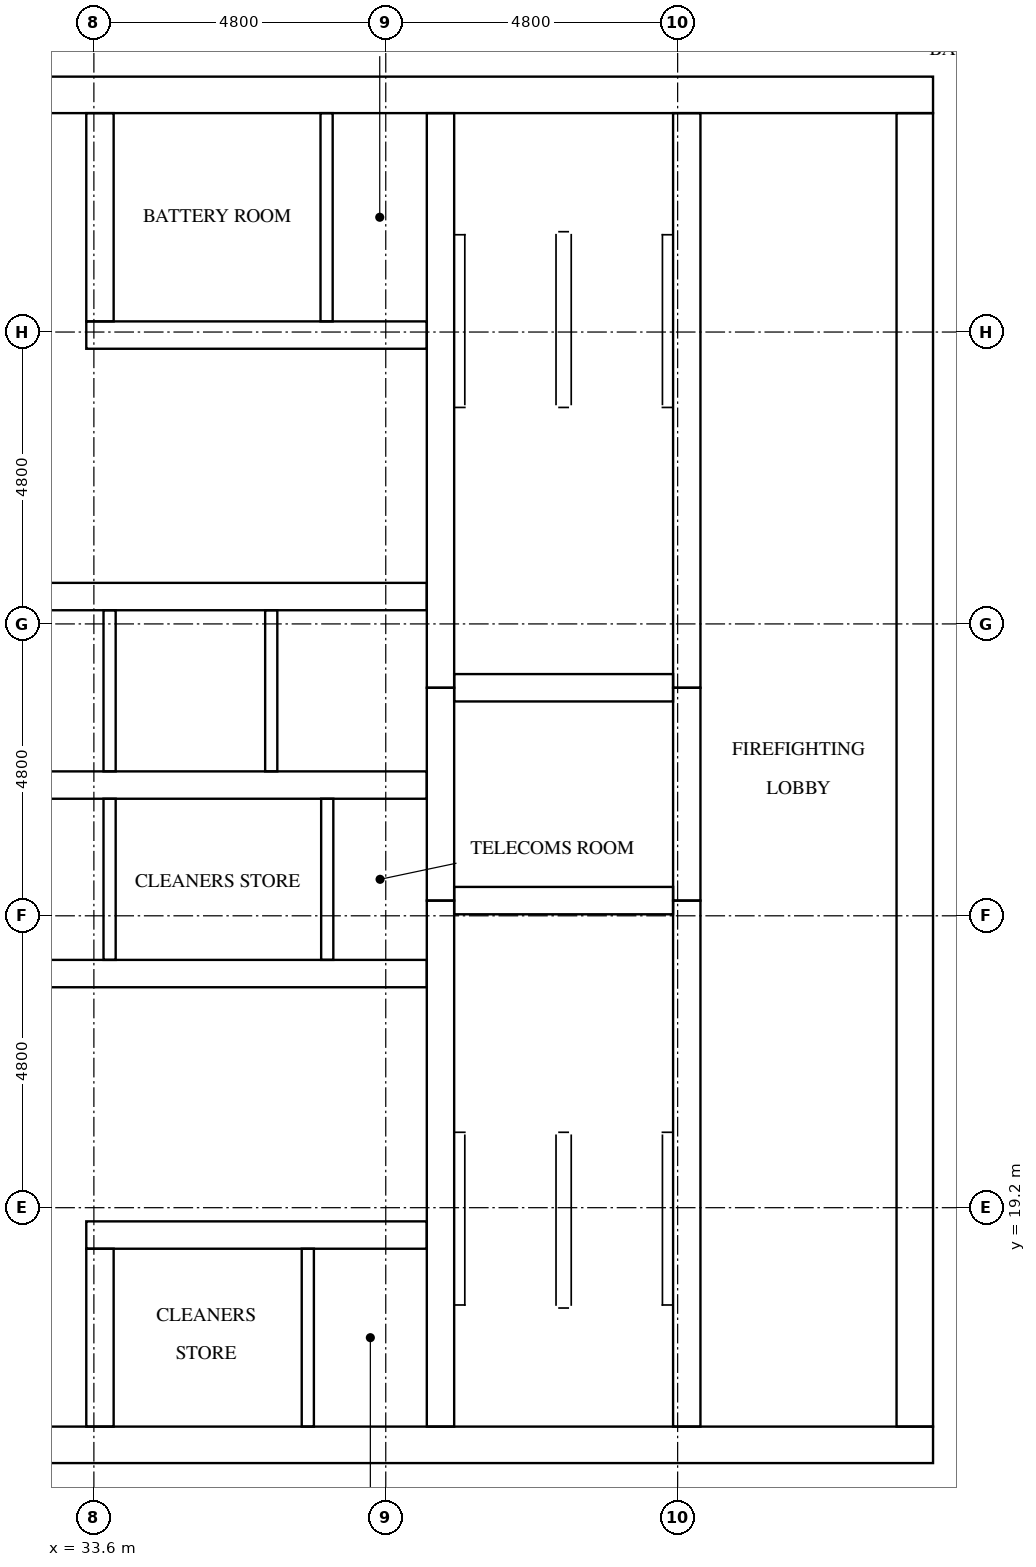
"""IFC4 building model, lengths in metres.
Left out: names, types, materials, properties, quantities, classifications, styles, units other than length and angle.
Written with IfcOpenShell. Run it as: python <this file> out.ifc"""

import sys

from ifc_helpers import new_model, si_unit, direction, frame, frame_2d, origin, place, context, subcontext, project, spatial, rectangle, extrude, element, fill, save


model = new_model("IFC4")
c1 = context("Model", 3, precision=1e-05, world=origin(), true_north=direction((0.0, 1.0)))
c2 = subcontext(c1, "Body", "Model", "MODEL_VIEW")
j1 = project(units=[si_unit("LENGTHUNIT", "METRE"), si_unit("PLANEANGLEUNIT", "RADIAN")], contexts=[c1])
p1 = place(None, origin())
s1 = spatial("IfcSite", under=j1, at=p1, CompositionType="ELEMENT")
p2 = place(p1, origin())
s2 = spatial("IfcBuilding", under=s1, at=p2, CompositionType="ELEMENT")
p3 = place(p2, frame((0.0, 0.0, 238.7)))
s3 = spatial("IfcBuildingStorey", under=s2, at=p3, CompositionType="ELEMENT", Elevation=238.7)
p4 = place(p3, frame((15.0, 15.3, 0.0), z_axis=(0.0, 0.0, 1.0), x_axis=(1.0, 0.0, 0.0)))
e1 = element("IfcWall", 1, at=p4, inside=s3, PredefinedType="SHEAR", context=c2, shape_type="SweptSolid", body=[
    extrude(rectangle(XDim=32.4, YDim=0.6, at=frame_2d((16.2, 0.0))), origin(), (0.0, 0.0, 1.0), 3.2),
])
p5 = place(p4, frame((15.3, 0.0, 0.0)))
e2 = element("IfcOpeningElement", 2, at=p5, cuts=e1, PredefinedType="OPENING", context=c2, shape_type="SweptSolid", body=[
    extrude(rectangle(XDim=1.8, YDim=2.1, at=frame_2d((0.9, 1.05))), frame((0.0, 0.31, 0.0), z_axis=(0.0, -1.0, 0.0), x_axis=(1.0, 0.0, 0.0)), (0.0, 0.0, 1.0), 0.62),
])
p6 = place(p3, frame((15.0, 37.5, 0.0), z_axis=(0.0, 0.0, 1.0), x_axis=(1.0, 0.0, 0.0)))
e3 = element("IfcWall", 3, at=p6, inside=s3, PredefinedType="SHEAR", context=c2, shape_type="SweptSolid", body=[
    extrude(rectangle(XDim=32.4, YDim=0.6, at=frame_2d((16.2, 0.0))), origin(), (0.0, 0.0, 1.0), 3.2),
])
p7 = place(p6, frame((15.3, 0.0, 0.0)))
e4 = element("IfcOpeningElement", 4, at=p7, cuts=e3, PredefinedType="OPENING", context=c2, shape_type="SweptSolid", body=[
    extrude(rectangle(XDim=1.8, YDim=2.1, at=frame_2d((0.9, 1.05))), frame((0.0, 0.31, 0.0), z_axis=(0.0, -1.0, 0.0), x_axis=(1.0, 0.0, 0.0)), (0.0, 0.0, 1.0), 0.62),
])
p8 = place(p6, frame((1.25, 0.0, 0.0)))
e5 = element("IfcOpeningElement", 5, at=p8, cuts=e3, PredefinedType="OPENING", context=c2, shape_type="SweptSolid", body=[
    extrude(rectangle(XDim=1.0, YDim=2.1, at=frame_2d((0.5, 1.05))), frame((0.0, 0.31, 0.0), z_axis=(0.0, -1.0, 0.0), x_axis=(1.0, 0.0, 0.0)), (0.0, 0.0, 1.0), 0.62),
])
p9 = place(p6, frame((4.988, 0.0, 0.0)))
e6 = element("IfcOpeningElement", 6, at=p9, cuts=e3, PredefinedType="OPENING", context=c2, shape_type="SweptSolid", body=[
    extrude(rectangle(XDim=1.0, YDim=2.1, at=frame_2d((0.5, 1.05))), frame((0.0, 0.31, 0.0), z_axis=(0.0, -1.0, 0.0), x_axis=(1.0, 0.0, 0.0)), (0.0, 0.0, 1.0), 0.62),
])
p10 = place(p3, frame((47.1, 15.6, 0.0), z_axis=(0.0, 0.0, 1.0), x_axis=(0.0, 1.0, 0.0)))
e7 = element("IfcWall", 7, at=p10, inside=s3, PredefinedType="SHEAR", context=c2, shape_type="SweptSolid", body=[
    extrude(rectangle(XDim=21.6, YDim=0.6, at=frame_2d((10.8, 0.0))), origin(), (0.0, 0.0, 1.0), 3.2),
])
p11 = place(p10, frame((10.5, 0.0, 0.0)))
e8 = element("IfcOpeningElement", 8, at=p11, cuts=e7, PredefinedType="OPENING", context=c2, shape_type="SweptSolid", body=[
    extrude(rectangle(XDim=1.2, YDim=2.1, at=frame_2d((0.6, 1.05))), frame((0.0, 0.31, 0.0), z_axis=(0.0, -1.0, 0.0), x_axis=(1.0, 0.0, 0.0)), (0.0, 0.0, 1.0), 0.62),
])
p12 = place(p3, frame((39.3, 15.6, 0.0), z_axis=(0.0, 0.0, 1.0), x_axis=(0.0, 1.0, 0.0)))
e9 = element("IfcWall", 9, at=p12, inside=s3, PredefinedType="SHEAR", context=c2, shape_type="SweptSolid", body=[
    extrude(rectangle(XDim=8.65, YDim=0.45, at=frame_2d((4.325, 0.0))), origin(), (0.0, 0.0, 1.0), 3.2),
])
p13 = place(p3, frame((39.3, 24.25, 0.0), z_axis=(0.0, 0.0, 1.0), x_axis=(0.0, 1.0, 0.0)))
e10 = element("IfcWall", 10, at=p13, inside=s3, PredefinedType="SHEAR", context=c2, shape_type="SweptSolid", body=[
    extrude(rectangle(XDim=3.5, YDim=0.45, at=frame_2d((1.75, 0.0))), origin(), (0.0, 0.0, 1.0), 3.2),
])
p14 = place(p3, frame((39.3, 27.75, 0.0), z_axis=(0.0, 0.0, 1.0), x_axis=(0.0, 1.0, 0.0)))
e11 = element("IfcWall", 11, at=p14, inside=s3, PredefinedType="SHEAR", context=c2, shape_type="SweptSolid", body=[
    extrude(rectangle(XDim=9.45, YDim=0.45, at=frame_2d((4.725, 0.0))), origin(), (0.0, 0.0, 1.0), 3.2),
])
p15 = place(p3, frame((43.35, 15.6, 0.0), z_axis=(0.0, 0.0, 1.0), x_axis=(0.0, 1.0, 0.0)))
e12 = element("IfcWall", 12, at=p15, inside=s3, PredefinedType="SHEAR", context=c2, shape_type="SweptSolid", body=[
    extrude(rectangle(XDim=8.65, YDim=0.45, at=frame_2d((4.325, 0.0))), origin(), (0.0, 0.0, 1.0), 3.2),
])
p16 = place(p15, frame((0.6, 0.0, 0.0)))
e13 = element("IfcOpeningElement", 13, at=p16, cuts=e12, PredefinedType="OPENING", context=c2, shape_type="SweptSolid", body=[
    extrude(rectangle(XDim=1.2, YDim=2.1, at=frame_2d((0.6, 1.05))), frame((0.0, 0.235, 0.0), z_axis=(0.0, -1.0, 0.0), x_axis=(1.0, 0.0, 0.0)), (0.0, 0.0, 1.0), 0.47),
])
p17 = place(p3, frame((43.35, 24.25, 0.0), z_axis=(0.0, 0.0, 1.0), x_axis=(0.0, 1.0, 0.0)))
e14 = element("IfcWall", 14, at=p17, inside=s3, PredefinedType="SHEAR", context=c2, shape_type="SweptSolid", body=[
    extrude(rectangle(XDim=3.5, YDim=0.45, at=frame_2d((1.75, 0.0))), origin(), (0.0, 0.0, 1.0), 3.2),
])
p18 = place(p17, frame((1.2, 0.0, 0.0)))
e15 = element("IfcOpeningElement", 15, at=p18, cuts=e14, PredefinedType="OPENING", context=c2, shape_type="SweptSolid", body=[
    extrude(rectangle(XDim=1.1, YDim=2.1, at=frame_2d((0.55, 1.05))), frame((0.0, 0.235, 0.0), z_axis=(0.0, -1.0, 0.0), x_axis=(1.0, 0.0, 0.0)), (0.0, 0.0, 1.0), 0.47),
])
p19 = place(p3, frame((43.35, 27.75, 0.0), z_axis=(0.0, 0.0, 1.0), x_axis=(0.0, 1.0, 0.0)))
e16 = element("IfcWall", 16, at=p19, inside=s3, PredefinedType="SHEAR", context=c2, shape_type="SweptSolid", body=[
    extrude(rectangle(XDim=9.45, YDim=0.45, at=frame_2d((4.725, 0.0))), origin(), (0.0, 0.0, 1.0), 3.2),
])
p20 = place(p19, frame((7.65, 0.0, 0.0)))
e17 = element("IfcOpeningElement", 17, at=p20, cuts=e16, PredefinedType="OPENING", context=c2, shape_type="SweptSolid", body=[
    extrude(rectangle(XDim=1.2, YDim=2.1, at=frame_2d((0.6, 1.05))), frame((0.0, 0.235, 0.0), z_axis=(0.0, -1.0, 0.0), x_axis=(1.0, 0.0, 0.0)), (0.0, 0.0, 1.0), 0.47),
])
for number, where, z_axis, x_axis in (
    (18, (39.525, 24.25, 0.0), (0.0, 0.0, 1.0), (1.0, 0.0, 0.0)),
    (19, (39.525, 27.75, 0.0), (0.0, 0.0, 1.0), (1.0, 0.0, 0.0)),
):
    element("IfcWall", number, at=place(p3, frame(where, z_axis=z_axis, x_axis=x_axis)), inside=s3, PredefinedType="SHEAR", context=c2, shape_type="SweptSolid", body=[
        extrude(rectangle(XDim=3.6, YDim=0.45, at=frame_2d((1.8, 0.0))), origin(), (0.0, 0.0, 1.0), 3.2),
    ])
p21 = place(p3, frame((33.475, 18.75, 0.0), z_axis=(0.0, 0.0, 1.0), x_axis=(1.0, 0.0, 0.0)))
e20 = element("IfcWall", 20, at=p21, inside=s3, PredefinedType="SHEAR", context=c2, shape_type="SweptSolid", body=[
    extrude(rectangle(XDim=5.6, YDim=0.45, at=frame_2d((2.8, 0.0))), origin(), (0.0, 0.0, 1.0), 3.2),
])
p22 = place(p21, frame((1.497, 0.0, 0.0)))
e21 = element("IfcOpeningElement", 21, at=p22, cuts=e20, PredefinedType="OPENING", context=c2, shape_type="SweptSolid", body=[
    extrude(rectangle(XDim=1.0, YDim=2.1, at=frame_2d((0.5, 1.05))), frame((0.0, 0.235, 0.0), z_axis=(0.0, -1.0, 0.0), x_axis=(1.0, 0.0, 0.0)), (0.0, 0.0, 1.0), 0.47),
])
p23 = place(p21, frame((4.171, 0.0, 0.0)))
e22 = element("IfcOpeningElement", 22, at=p23, cuts=e20, PredefinedType="OPENING", context=c2, shape_type="SweptSolid", body=[
    extrude(rectangle(XDim=1.0, YDim=2.1, at=frame_2d((0.5, 1.05))), frame((0.0, 0.235, 0.0), z_axis=(0.0, -1.0, 0.0), x_axis=(1.0, 0.0, 0.0)), (0.0, 0.0, 1.0), 0.47),
])
p24 = place(p3, frame((23.325, 23.05, 0.0), z_axis=(0.0, 0.0, 1.0), x_axis=(1.0, 0.0, 0.0)))
e23 = element("IfcWall", 23, at=p24, inside=s3, PredefinedType="SHEAR", context=c2, shape_type="SweptSolid", body=[
    extrude(rectangle(XDim=15.75, YDim=0.45, at=frame_2d((7.875, 0.0))), origin(), (0.0, 0.0, 1.0), 3.2),
])
p25 = place(p24, frame((2.058, 0.0, 0.0)))
e24 = element("IfcOpeningElement", 24, at=p25, cuts=e23, PredefinedType="OPENING", context=c2, shape_type="SweptSolid", body=[
    extrude(rectangle(XDim=1.0, YDim=2.1, at=frame_2d((0.5, 1.05))), frame((0.0, 0.235, 0.0), z_axis=(0.0, -1.0, 0.0), x_axis=(1.0, 0.0, 0.0)), (0.0, 0.0, 1.0), 0.47),
])
p26 = place(p24, frame((11.823, 0.0, 0.0)))
e25 = element("IfcOpeningElement", 25, at=p26, cuts=e23, PredefinedType="OPENING", context=c2, shape_type="SweptSolid", body=[
    extrude(rectangle(XDim=1.0, YDim=2.1, at=frame_2d((0.5, 1.05))), frame((0.0, 0.235, 0.0), z_axis=(0.0, -1.0, 0.0), x_axis=(1.0, 0.0, 0.0)), (0.0, 0.0, 1.0), 0.47),
])
p27 = place(p24, frame((14.481, 0.0, 0.0)))
e26 = element("IfcOpeningElement", 26, at=p27, cuts=e23, PredefinedType="OPENING", context=c2, shape_type="SweptSolid", body=[
    extrude(rectangle(XDim=1.0, YDim=2.1, at=frame_2d((0.5, 1.05))), frame((0.0, 0.235, 0.0), z_axis=(0.0, -1.0, 0.0), x_axis=(1.0, 0.0, 0.0)), (0.0, 0.0, 1.0), 0.47),
])
p28 = place(p3, frame((23.325, 26.15, 0.0), z_axis=(0.0, 0.0, 1.0), x_axis=(1.0, 0.0, 0.0)))
e27 = element("IfcWall", 27, at=p28, inside=s3, PredefinedType="SHEAR", context=c2, shape_type="SweptSolid", body=[
    extrude(rectangle(XDim=15.75, YDim=0.45, at=frame_2d((7.875, 0.0))), origin(), (0.0, 0.0, 1.0), 3.2),
])
p29 = place(p3, frame((23.325, 29.25, 0.0), z_axis=(0.0, 0.0, 1.0), x_axis=(1.0, 0.0, 0.0)))
e28 = element("IfcWall", 28, at=p29, inside=s3, PredefinedType="SHEAR", context=c2, shape_type="SweptSolid", body=[
    extrude(rectangle(XDim=15.75, YDim=0.45, at=frame_2d((7.875, 0.0))), origin(), (0.0, 0.0, 1.0), 3.2),
])
p30 = place(p29, frame((0.679, 0.0, 0.0)))
e29 = element("IfcOpeningElement", 29, at=p30, cuts=e28, PredefinedType="OPENING", context=c2, shape_type="SweptSolid", body=[
    extrude(rectangle(XDim=1.1, YDim=2.1, at=frame_2d((0.55, 1.05))), frame((0.0, 0.235, 0.0), z_axis=(0.0, -1.0, 0.0), x_axis=(1.0, 0.0, 0.0)), (0.0, 0.0, 1.0), 0.47),
])
p31 = place(p29, frame((3.337, 0.0, 0.0)))
e30 = element("IfcOpeningElement", 30, at=p31, cuts=e28, PredefinedType="OPENING", context=c2, shape_type="SweptSolid", body=[
    extrude(rectangle(XDim=1.1, YDim=2.1, at=frame_2d((0.55, 1.05))), frame((0.0, 0.235, 0.0), z_axis=(0.0, -1.0, 0.0), x_axis=(1.0, 0.0, 0.0)), (0.0, 0.0, 1.0), 0.47),
])
p32 = place(p29, frame((5.996, 0.0, 0.0)))
e31 = element("IfcOpeningElement", 31, at=p32, cuts=e28, PredefinedType="OPENING", context=c2, shape_type="SweptSolid", body=[
    extrude(rectangle(XDim=1.1, YDim=2.1, at=frame_2d((0.55, 1.05))), frame((0.0, 0.235, 0.0), z_axis=(0.0, -1.0, 0.0), x_axis=(1.0, 0.0, 0.0)), (0.0, 0.0, 1.0), 0.47),
])
p33 = place(p29, frame((8.654, 0.0, 0.0)))
e32 = element("IfcOpeningElement", 32, at=p33, cuts=e28, PredefinedType="OPENING", context=c2, shape_type="SweptSolid", body=[
    extrude(rectangle(XDim=1.1, YDim=2.1, at=frame_2d((0.55, 1.05))), frame((0.0, 0.235, 0.0), z_axis=(0.0, -1.0, 0.0), x_axis=(1.0, 0.0, 0.0)), (0.0, 0.0, 1.0), 0.47),
])
p34 = place(p29, frame((11.312, 0.0, 0.0)))
e33 = element("IfcOpeningElement", 33, at=p34, cuts=e28, PredefinedType="OPENING", context=c2, shape_type="SweptSolid", body=[
    extrude(rectangle(XDim=1.1, YDim=2.1, at=frame_2d((0.55, 1.05))), frame((0.0, 0.235, 0.0), z_axis=(0.0, -1.0, 0.0), x_axis=(1.0, 0.0, 0.0)), (0.0, 0.0, 1.0), 0.47),
])
p35 = place(p29, frame((13.971, 0.0, 0.0)))
e34 = element("IfcOpeningElement", 34, at=p35, cuts=e28, PredefinedType="OPENING", context=c2, shape_type="SweptSolid", body=[
    extrude(rectangle(XDim=1.1, YDim=2.1, at=frame_2d((0.55, 1.05))), frame((0.0, 0.235, 0.0), z_axis=(0.0, -1.0, 0.0), x_axis=(1.0, 0.0, 0.0)), (0.0, 0.0, 1.0), 0.47),
])
p36 = place(p3, frame((33.475, 33.55, 0.0), z_axis=(0.0, 0.0, 1.0), x_axis=(1.0, 0.0, 0.0)))
e35 = element("IfcWall", 35, at=p36, inside=s3, PredefinedType="SHEAR", context=c2, shape_type="SweptSolid", body=[
    extrude(rectangle(XDim=5.6, YDim=0.45, at=frame_2d((2.8, 0.0))), origin(), (0.0, 0.0, 1.0), 3.2),
])
p37 = place(p36, frame((1.651, 0.0, 0.0)))
e36 = element("IfcOpeningElement", 36, at=p37, cuts=e35, PredefinedType="OPENING", context=c2, shape_type="SweptSolid", body=[
    extrude(rectangle(XDim=1.0, YDim=2.1, at=frame_2d((0.5, 1.05))), frame((0.0, 0.235, 0.0), z_axis=(0.0, -1.0, 0.0), x_axis=(1.0, 0.0, 0.0)), (0.0, 0.0, 1.0), 0.47),
])
p38 = place(p36, frame((4.326, 0.0, 0.0)))
e37 = element("IfcOpeningElement", 37, at=p38, cuts=e35, PredefinedType="OPENING", context=c2, shape_type="SweptSolid", body=[
    extrude(rectangle(XDim=1.0, YDim=2.1, at=frame_2d((0.5, 1.05))), frame((0.0, 0.235, 0.0), z_axis=(0.0, -1.0, 0.0), x_axis=(1.0, 0.0, 0.0)), (0.0, 0.0, 1.0), 0.47),
])
p39 = place(p3, frame((33.7, 15.6, 0.0), z_axis=(0.0, 0.0, 1.0), x_axis=(0.0, 1.0, 0.0)))
e38 = element("IfcWall", 38, at=p39, inside=s3, PredefinedType="SHEAR", context=c2, shape_type="SweptSolid", body=[
    extrude(rectangle(XDim=2.925, YDim=0.45, at=frame_2d((1.462, 0.0))), origin(), (0.0, 0.0, 1.0), 3.2),
])
p40 = place(p3, frame((33.7, 33.775, 0.0), z_axis=(0.0, 0.0, 1.0), x_axis=(0.0, 1.0, 0.0)))
e39 = element("IfcWall", 39, at=p40, inside=s3, PredefinedType="SHEAR", context=c2, shape_type="SweptSolid", body=[
    extrude(rectangle(XDim=3.425, YDim=0.45, at=frame_2d((1.712, 0.0))), origin(), (0.0, 0.0, 1.0), 3.2),
])
p41 = place(p3, frame((33.858, 23.275, 0.0), z_axis=(0.0, 0.0, 1.0), x_axis=(0.0, 1.0, 0.0)))
e40 = element("IfcWall", 40, at=p41, inside=s3, PredefinedType="SOLIDWALL", context=c2, shape_type="SweptSolid", body=[
    extrude(rectangle(XDim=2.65, YDim=0.2, at=frame_2d((1.325, 0.0))), origin(), (0.0, 0.0, 1.0), 3.2),
])
for number, where, z_axis, x_axis in (
    (41, (33.858, 26.375, 0.0), (0.0, 0.0, 1.0), (0.0, 1.0, 0.0)),
    (42, (36.517, 26.375, 0.0), (0.0, 0.0, 1.0), (0.0, 1.0, 0.0)),
):
    element("IfcWall", number, at=place(p3, frame(where, z_axis=z_axis, x_axis=x_axis)), inside=s3, PredefinedType="SOLIDWALL", context=c2, shape_type="SweptSolid", body=[
        extrude(rectangle(XDim=2.65, YDim=0.2, at=frame_2d((1.325, 0.0))), origin(), (0.0, 0.0, 1.0), 3.2),
    ])
p42 = place(p3, frame((37.438, 23.275, 0.0), z_axis=(0.0, 0.0, 1.0), x_axis=(0.0, 1.0, 0.0)))
e43 = element("IfcWall", 43, at=p42, inside=s3, PredefinedType="PARTITIONING", context=c2, shape_type="SweptSolid", body=[
    extrude(rectangle(XDim=2.65, YDim=0.2, at=frame_2d((1.325, 0.0))), origin(), (0.0, 0.0, 1.0), 3.2),
])
p43 = place(p3, frame((37.118, 15.6, 0.0), z_axis=(0.0, 0.0, 1.0), x_axis=(0.0, 1.0, 0.0)))
e44 = element("IfcWall", 44, at=p43, inside=s3, PredefinedType="PARTITIONING", context=c2, shape_type="SweptSolid", body=[
    extrude(rectangle(XDim=2.925, YDim=0.2, at=frame_2d((1.462, 0.0))), origin(), (0.0, 0.0, 1.0), 3.2),
])
p44 = place(p3, frame((37.427, 33.775, 0.0), z_axis=(0.0, 0.0, 1.0), x_axis=(0.0, 1.0, 0.0)))
e45 = element("IfcWall", 45, at=p44, inside=s3, PredefinedType="PARTITIONING", context=c2, shape_type="SweptSolid", body=[
    extrude(rectangle(XDim=3.425, YDim=0.2, at=frame_2d((1.712, 0.0))), origin(), (0.0, 0.0, 1.0), 3.2),
])
p45 = place(p33, origin())
e46 = element("IfcDoor", 46, at=p45, inside=s3, OperationType="DOUBLE_DOOR_SLIDING", PredefinedType="DOOR", context=c2, shape_type="SweptSolid", body=[
    extrude(rectangle(XDim=1.1, YDim=2.1, at=frame_2d((0.55, 1.05))), frame((0.0, 0.025, 0.0), z_axis=(0.0, -1.0, 0.0), x_axis=(1.0, 0.0, 0.0)), (0.0, 0.0, 1.0), 0.05),
])
fill(e32, e46)
p46 = place(p34, origin())
e47 = element("IfcDoor", 47, at=p46, inside=s3, OperationType="DOUBLE_DOOR_SLIDING", PredefinedType="DOOR", context=c2, shape_type="SweptSolid", body=[
    extrude(rectangle(XDim=1.1, YDim=2.1, at=frame_2d((0.55, 1.05))), frame((0.0, 0.025, 0.0), z_axis=(0.0, -1.0, 0.0), x_axis=(1.0, 0.0, 0.0)), (0.0, 0.0, 1.0), 0.05),
])
fill(e33, e47)
p47 = place(p35, origin())
e48 = element("IfcDoor", 48, at=p47, inside=s3, OperationType="DOUBLE_DOOR_SLIDING", PredefinedType="DOOR", context=c2, shape_type="SweptSolid", body=[
    extrude(rectangle(XDim=1.1, YDim=2.1, at=frame_2d((0.55, 1.05))), frame((0.0, 0.025, 0.0), z_axis=(0.0, -1.0, 0.0), x_axis=(1.0, 0.0, 0.0)), (0.0, 0.0, 1.0), 0.05),
])
fill(e34, e48)
p48 = place(p18, origin())
e49 = element("IfcDoor", 49, at=p48, inside=s3, OperationType="DOUBLE_DOOR_SLIDING", PredefinedType="DOOR", context=c2, shape_type="SweptSolid", body=[
    extrude(rectangle(XDim=1.1, YDim=2.1, at=frame_2d((0.55, 1.05))), frame((0.0, 0.025, 0.0), z_axis=(0.0, -1.0, 0.0), x_axis=(1.0, 0.0, 0.0)), (0.0, 0.0, 1.0), 0.05),
])
fill(e15, e49)
p49 = place(p16, origin())
e50 = element("IfcDoor", 50, at=p49, inside=s3, OperationType="SINGLE_SWING_LEFT", PredefinedType="DOOR", context=c2, shape_type="SweptSolid", body=[
    extrude(rectangle(XDim=1.2, YDim=2.1, at=frame_2d((0.6, 1.05))), frame((0.0, 0.025, 0.0), z_axis=(0.0, -1.0, 0.0), x_axis=(1.0, 0.0, 0.0)), (0.0, 0.0, 1.0), 0.05),
])
fill(e13, e50)
p50 = place(p20, origin())
e51 = element("IfcDoor", 51, at=p50, inside=s3, OperationType="SINGLE_SWING_RIGHT", PredefinedType="DOOR", context=c2, shape_type="SweptSolid", body=[
    extrude(rectangle(XDim=1.2, YDim=2.1, at=frame_2d((0.6, 1.05))), frame((0.0, 0.025, 0.0), z_axis=(0.0, -1.0, 0.0), x_axis=(1.0, 0.0, 0.0)), (0.0, 0.0, 1.0), 0.05),
])
fill(e17, e51)
p51 = place(p11, origin())
e52 = element("IfcDoor", 52, at=p51, inside=s3, OperationType="SINGLE_SWING_RIGHT", PredefinedType="DOOR", context=c2, shape_type="SweptSolid", body=[
    extrude(rectangle(XDim=1.2, YDim=2.1, at=frame_2d((0.6, 1.05))), frame((0.0, 0.025, 0.0), z_axis=(0.0, -1.0, 0.0), x_axis=(1.0, 0.0, 0.0)), (0.0, 0.0, 1.0), 0.05),
])
fill(e8, e52)
p52 = place(p26, frame((1.0, 0.0, 0.0), z_axis=(0.0, 0.0, 1.0), x_axis=(-1.0, 0.0, 0.0)))
e53 = element("IfcDoor", 53, at=p52, inside=s3, OperationType="SINGLE_SWING_RIGHT", PredefinedType="DOOR", context=c2, shape_type="SweptSolid", body=[
    extrude(rectangle(XDim=1.0, YDim=2.1, at=frame_2d((0.5, 1.05))), frame((0.0, 0.025, 0.0), z_axis=(0.0, -1.0, 0.0), x_axis=(1.0, 0.0, 0.0)), (0.0, 0.0, 1.0), 0.05),
])
fill(e25, e53)
p53 = place(p27, frame((1.0, 0.0, 0.0), z_axis=(0.0, 0.0, 1.0), x_axis=(-1.0, 0.0, 0.0)))
e54 = element("IfcDoor", 54, at=p53, inside=s3, OperationType="SINGLE_SWING_LEFT", PredefinedType="DOOR", context=c2, shape_type="SweptSolid", body=[
    extrude(rectangle(XDim=1.0, YDim=2.1, at=frame_2d((0.5, 1.05))), frame((0.0, 0.025, 0.0), z_axis=(0.0, -1.0, 0.0), x_axis=(1.0, 0.0, 0.0)), (0.0, 0.0, 1.0), 0.05),
])
fill(e26, e54)
p54 = place(p22, origin())
e55 = element("IfcDoor", 55, at=p54, inside=s3, OperationType="SINGLE_SWING_RIGHT", PredefinedType="DOOR", context=c2, shape_type="SweptSolid", body=[
    extrude(rectangle(XDim=1.0, YDim=2.1, at=frame_2d((0.5, 1.05))), frame((0.0, 0.025, 0.0), z_axis=(0.0, -1.0, 0.0), x_axis=(1.0, 0.0, 0.0)), (0.0, 0.0, 1.0), 0.05),
])
fill(e21, e55)
p55 = place(p23, origin())
e56 = element("IfcDoor", 56, at=p55, inside=s3, OperationType="SINGLE_SWING_LEFT", PredefinedType="DOOR", context=c2, shape_type="SweptSolid", body=[
    extrude(rectangle(XDim=1.0, YDim=2.1, at=frame_2d((0.5, 1.05))), frame((0.0, 0.025, 0.0), z_axis=(0.0, -1.0, 0.0), x_axis=(1.0, 0.0, 0.0)), (0.0, 0.0, 1.0), 0.05),
])
fill(e22, e56)
p56 = place(p37, frame((1.0, 0.0, 0.0), z_axis=(0.0, 0.0, 1.0), x_axis=(-1.0, 0.0, 0.0)))
e57 = element("IfcDoor", 57, at=p56, inside=s3, OperationType="SINGLE_SWING_RIGHT", PredefinedType="DOOR", context=c2, shape_type="SweptSolid", body=[
    extrude(rectangle(XDim=1.0, YDim=2.1, at=frame_2d((0.5, 1.05))), frame((0.0, 0.025, 0.0), z_axis=(0.0, -1.0, 0.0), x_axis=(1.0, 0.0, 0.0)), (0.0, 0.0, 1.0), 0.05),
])
fill(e36, e57)
p57 = place(p38, frame((1.0, 0.0, 0.0), z_axis=(0.0, 0.0, 1.0), x_axis=(-1.0, 0.0, 0.0)))
e58 = element("IfcDoor", 58, at=p57, inside=s3, OperationType="SINGLE_SWING_LEFT", PredefinedType="DOOR", context=c2, shape_type="SweptSolid", body=[
    extrude(rectangle(XDim=1.0, YDim=2.1, at=frame_2d((0.5, 1.05))), frame((0.0, 0.025, 0.0), z_axis=(0.0, -1.0, 0.0), x_axis=(1.0, 0.0, 0.0)), (0.0, 0.0, 1.0), 0.05),
])
fill(e37, e58)
save(model, sys.argv[1])
